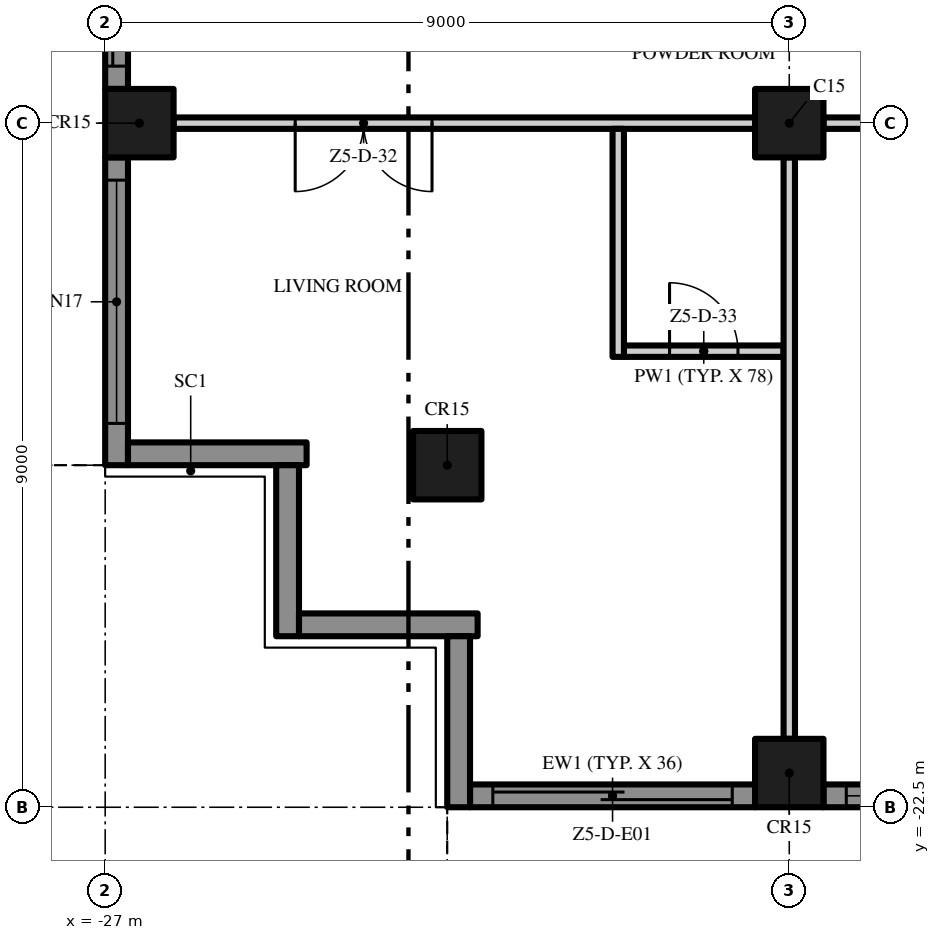
"""IFC4 building model, lengths in metres.
Left out: names, types, materials, properties, quantities, classifications, styles, units other than length and angle.
Written with IfcOpenShell. Run it as: python <this file> out.ifc"""

import sys

from ifc_helpers import new_model, si_unit, direction, frame, frame_2d, origin, origin_2d, place, context, subcontext, project, spatial, polyline, rectangle, outline, extrude, element, fill, save


model = new_model("IFC4")
c1 = context("Model", 3, precision=1e-05, world=origin(), true_north=direction((0.0, 1.0)))
c2 = subcontext(c1, "Body", "Model", "MODEL_VIEW")
j1 = project(units=[si_unit("LENGTHUNIT", "METRE"), si_unit("PLANEANGLEUNIT", "RADIAN")], contexts=[c1])
p1 = place(None, origin())
s1 = spatial("IfcSite", under=j1, at=p1, CompositionType="ELEMENT")
p2 = place(p1, origin())
s2 = spatial("IfcBuilding", under=s1, at=p2, CompositionType="ELEMENT")
p3 = place(p2, frame((0.0, 0.0, 280.6)))
s3 = spatial("IfcBuildingStorey", under=s2, at=p3, CompositionType="ELEMENT", Elevation=280.6)
for number, where, z_axis, x_axis in (
    (1, (-18.0, -13.5, 0.0), (0.0, 0.0, 1.0), (1.0, 0.0, 0.0)),
    (2, (-18.0, -22.05, 0.0), (0.0, 0.0, 1.0), (1.0, 0.0, 0.0)),
    (3, (-26.55, -13.5, 0.0), (0.0, 0.0, 1.0), (1.0, 0.0, 0.0)),
    (4, (-22.5, -18.0, 0.0), (0.0, 0.0, 1.0), (1.0, 0.0, 0.0)),
):
    element("IfcColumn", number, at=place(p3, frame(where, z_axis=z_axis, x_axis=x_axis)), inside=s3, PredefinedType="COLUMN", context=c2, shape_type="SweptSolid", body=[
        extrude(rectangle(XDim=0.9, YDim=0.9, at=origin_2d()), origin(), (0.0, 0.0, 1.0), 3.5),
    ])
p4 = place(p3, frame((-18.45, -22.35, 0.0), z_axis=(0.0, 0.0, 1.0), x_axis=(-1.0, 0.0, 0.0)))
e5 = element("IfcWall", 5, at=p4, inside=s3, PredefinedType="SOLIDWALL", context=c2, shape_type="SweptSolid", body=[
    extrude(rectangle(XDim=3.75, YDim=0.3, at=frame_2d((1.875, 0.0))), origin(), (0.0, 0.0, 1.0), 3.5),
])
p5 = place(p4, frame((0.3, 0.0, 0.0)))
e6 = element("IfcOpeningElement", 6, at=p5, cuts=e5, PredefinedType="OPENING", context=c2, shape_type="SweptSolid", body=[
    extrude(rectangle(XDim=3.15, YDim=2.4, at=frame_2d((1.575, 1.2))), frame((0.0, 0.16, 0.0), z_axis=(0.0, -1.0, 0.0), x_axis=(1.0, 0.0, 0.0)), (0.0, 0.0, 1.0), 0.32),
])
p6 = place(p3, frame((-9.45, -22.35, 0.0), z_axis=(0.0, 0.0, 1.0), x_axis=(-1.0, 0.0, 0.0)))
e7 = element("IfcWall", 7, at=p6, inside=s3, PredefinedType="SOLIDWALL", context=c2, shape_type="SweptSolid", body=[
    extrude(rectangle(XDim=8.1, YDim=0.3, at=frame_2d((4.05, 0.0))), origin(), (0.0, 0.0, 1.0), 3.5),
])
p7 = place(p6, frame((4.6, 0.0, 0.45)))
e8 = element("IfcOpeningElement", 8, at=p7, cuts=e7, PredefinedType="OPENING", context=c2, shape_type="SweptSolid", body=[
    extrude(rectangle(XDim=3.2, YDim=2.65, at=frame_2d((1.6, 1.325))), frame((0.0, 0.16, 0.0), z_axis=(0.0, -1.0, 0.0), x_axis=(1.0, 0.0, 0.0)), (0.0, 0.0, 1.0), 0.32),
])
p8 = place(p6, frame((0.3, 0.0, 0.45)))
e9 = element("IfcOpeningElement", 9, at=p8, cuts=e7, PredefinedType="OPENING", context=c2, shape_type="SweptSolid", body=[
    extrude(rectangle(XDim=3.2, YDim=2.65, at=frame_2d((1.6, 1.325))), frame((0.0, 0.16, 0.0), z_axis=(0.0, -1.0, 0.0), x_axis=(1.0, 0.0, 0.0)), (0.0, 0.0, 1.0), 0.32),
])
p9 = place(p3, frame((-26.85, -13.05, 0.0), z_axis=(0.0, 0.0, 1.0), x_axis=(0.0, 1.0, 0.0)))
e10 = element("IfcWall", 10, at=p9, inside=s3, PredefinedType="SOLIDWALL", context=c2, shape_type="SweptSolid", body=[
    extrude(rectangle(XDim=8.1, YDim=0.3, at=frame_2d((4.05, 0.0))), origin(), (0.0, 0.0, 1.0), 3.5),
])
p10 = place(p9, frame((4.6, 0.0, 0.45)))
e11 = element("IfcOpeningElement", 11, at=p10, cuts=e10, PredefinedType="OPENING", context=c2, shape_type="SweptSolid", body=[
    extrude(rectangle(XDim=3.2, YDim=2.65, at=frame_2d((1.6, 1.325))), frame((0.0, 0.16, 0.0), z_axis=(0.0, -1.0, 0.0), x_axis=(1.0, 0.0, 0.0)), (0.0, 0.0, 1.0), 0.32),
])
p11 = place(p9, frame((0.3, 0.0, 0.0)))
e12 = element("IfcOpeningElement", 12, at=p11, cuts=e10, PredefinedType="OPENING", context=c2, shape_type="SweptSolid", body=[
    extrude(rectangle(XDim=3.2, YDim=2.4, at=frame_2d((1.6, 1.2))), frame((0.0, 0.16, 0.0), z_axis=(0.0, -1.0, 0.0), x_axis=(1.0, 0.0, 0.0)), (0.0, 0.0, 1.0), 0.32),
])
p12 = place(p3, frame((-26.85, -18.0, 0.0), z_axis=(0.0, 0.0, 1.0), x_axis=(0.0, 1.0, 0.0)))
e13 = element("IfcWall", 13, at=p12, inside=s3, PredefinedType="SOLIDWALL", context=c2, shape_type="SweptSolid", body=[
    extrude(rectangle(XDim=4.05, YDim=0.3, at=frame_2d((2.025, 0.0))), origin(), (0.0, 0.0, 1.0), 3.5),
])
p13 = place(p12, frame((0.55, 0.0, 0.45)))
e14 = element("IfcOpeningElement", 14, at=p13, cuts=e13, PredefinedType="OPENING", context=c2, shape_type="SweptSolid", body=[
    extrude(rectangle(XDim=3.2, YDim=2.65, at=frame_2d((1.6, 1.325))), frame((0.0, 0.16, 0.0), z_axis=(0.0, -1.0, 0.0), x_axis=(1.0, 0.0, 0.0)), (0.0, 0.0, 1.0), 0.32),
])
p14 = place(p3, frame((-24.35, -17.85, 0.0), z_axis=(0.0, 0.0, 1.0), x_axis=(-1.0, 0.0, 0.0)))
e15 = element("IfcWall", 15, at=p14, inside=s3, PredefinedType="SOLIDWALL", context=c2, shape_type="SweptSolid", body=[
    extrude(rectangle(XDim=2.35, YDim=0.3, at=frame_2d((1.175, 0.0))), origin(), (0.0, 0.0, 1.0), 3.5),
])
p15 = place(p3, frame((-24.6, -20.25, 0.0), z_axis=(0.0, 0.0, 1.0), x_axis=(0.0, 1.0, 0.0)))
e16 = element("IfcWall", 16, at=p15, inside=s3, PredefinedType="SOLIDWALL", context=c2, shape_type="SweptSolid", body=[
    extrude(rectangle(XDim=2.25, YDim=0.3, at=frame_2d((1.125, 0.0))), origin(), (0.0, 0.0, 1.0), 3.5),
])
p16 = place(p3, frame((-22.1, -20.1, 0.0), z_axis=(0.0, 0.0, 1.0), x_axis=(-1.0, 0.0, 0.0)))
e17 = element("IfcWall", 17, at=p16, inside=s3, PredefinedType="SOLIDWALL", context=c2, shape_type="SweptSolid", body=[
    extrude(rectangle(XDim=2.35, YDim=0.3, at=frame_2d((1.175, 0.0))), origin(), (0.0, 0.0, 1.0), 3.5),
])
p17 = place(p3, frame((-22.35, -22.5, 0.0), z_axis=(0.0, 0.0, 1.0), x_axis=(0.0, 1.0, 0.0)))
e18 = element("IfcWall", 18, at=p17, inside=s3, PredefinedType="SOLIDWALL", context=c2, shape_type="SweptSolid", body=[
    extrude(rectangle(XDim=2.25, YDim=0.3, at=frame_2d((1.125, 0.0))), origin(), (0.0, 0.0, 1.0), 3.5),
])
p18 = place(p3, origin())
e19 = element("IfcWall", 19, at=p18, inside=s3, PredefinedType="USERDEFINED", context=c2, shape_type="SweptSolid", body=[
    extrude(outline(polyline([(-22.5, -25.5), (-21.0, -25.271), (-19.5, -24.671), (-18.0, -23.929), (-16.5, -23.329), (-15.0, -23.1), (-13.5, -23.329), (-12.0, -23.929), (-10.5, -24.671), (-9.0, -25.271), (-7.5, -25.5), (-6.0, -25.271), (-4.5, -24.671), (-3.0, -23.929), (-1.5, -23.329), (0.0, -23.1), (1.5, -23.329), (3.0, -23.929), (4.5, -24.671), (6.0, -25.271), (7.5, -25.5), (9.0, -25.271), (10.5, -24.671), (12.0, -23.929), (13.5, -23.329), (15.0, -23.1), (16.5, -23.329), (18.0, -23.929), (19.5, -24.671), (21.0, -25.271), (22.5, -25.5), (22.538, -25.253), (21.066, -25.028), (19.602, -24.442), (18.102, -23.701), (16.566, -23.086), (15.0, -22.847), (13.434, -23.086), (11.898, -23.701), (10.398, -24.442), (8.934, -25.028), (7.5, -25.247), (6.066, -25.028), (4.602, -24.442), (3.102, -23.701), (1.566, -23.086), (0.0, -22.847), (-1.566, -23.086), (-3.102, -23.701), (-4.602, -24.442), (-6.066, -25.028), (-7.5, -25.247), (-8.934, -25.028), (-10.398, -24.442), (-11.898, -23.701), (-13.434, -23.086), (-15.0, -22.847), (-16.566, -23.086), (-18.102, -23.701), (-19.602, -24.442), (-21.066, -25.028), (-22.538, -25.253), (-22.5, -25.5)])), origin(), (0.0, 0.0, 1.0), 0.9),
])
p19 = place(p3, origin())
e20 = element("IfcWall", 20, at=p19, inside=s3, PredefinedType="USERDEFINED", context=c2, shape_type="SweptSolid", body=[
    extrude(outline(polyline([(-30.0, 18.0), (-29.771, 16.5), (-29.171, 15.0), (-28.429, 13.5), (-27.829, 12.0), (-27.6, 10.5), (-27.829, 9.0), (-28.429, 7.5), (-29.171, 6.0), (-29.771, 4.5), (-30.0, 3.0), (-29.771, 1.5), (-29.171, 0.0), (-28.429, -1.5), (-27.829, -3.0), (-27.6, -4.5), (-27.829, -6.0), (-28.429, -7.5), (-29.171, -9.0), (-29.771, -10.5), (-30.0, -12.0), (-29.771, -13.5), (-29.171, -15.0), (-28.429, -16.5), (-27.829, -18.0), (-27.597, -17.907), (-28.201, -16.398), (-28.942, -14.898), (-29.528, -13.434), (-29.747, -12.0), (-29.528, -10.566), (-28.942, -9.102), (-28.201, -7.602), (-27.586, -6.066), (-27.347, -4.5), (-27.586, -2.934), (-28.201, -1.398), (-28.942, 0.102), (-29.528, 1.566), (-29.747, 3.0), (-29.528, 4.434), (-28.942, 5.898), (-28.201, 7.398), (-27.586, 8.934), (-27.347, 10.5), (-27.586, 12.066), (-28.201, 13.602), (-28.942, 15.102), (-29.528, 16.566), (-29.753, 18.038), (-30.0, 18.0)])), origin(), (0.0, 0.0, 1.0), 0.9),
])
p20 = place(p3, frame((-20.175, -16.5, 0.0), z_axis=(0.0, 0.0, 1.0), x_axis=(1.0, 0.0, 0.0)))
e21 = element("IfcWall", 21, at=p20, inside=s3, PredefinedType="PARTITIONING", context=c2, shape_type="SweptSolid", body=[
    extrude(rectangle(XDim=2.1, YDim=0.15, at=frame_2d((1.05, 0.0))), origin(), (0.0, 0.0, 1.0), 3.5),
])
p21 = place(p20, frame((0.6, 0.0, 0.0)))
e22 = element("IfcOpeningElement", 22, at=p21, cuts=e21, PredefinedType="OPENING", context=c2, shape_type="SweptSolid", body=[
    extrude(rectangle(XDim=0.9, YDim=2.1, at=frame_2d((0.45, 1.05))), frame((0.0, 0.085, 0.0), z_axis=(0.0, -1.0, 0.0), x_axis=(1.0, 0.0, 0.0)), (0.0, 0.0, 1.0), 0.17),
])
p22 = place(p3, frame((-18.45, -13.5, 0.0), z_axis=(0.0, 0.0, 1.0), x_axis=(-1.0, 0.0, 0.0)))
e23 = element("IfcWall", 23, at=p22, inside=s3, PredefinedType="PARTITIONING", context=c2, shape_type="SweptSolid", body=[
    extrude(rectangle(XDim=7.65, YDim=0.15, at=frame_2d((3.825, 0.0))), origin(), (0.0, 0.0, 1.0), 3.5),
])
p23 = place(p22, frame((4.25, 0.0, 0.0)))
e24 = element("IfcOpeningElement", 24, at=p23, cuts=e23, PredefinedType="OPENING", context=c2, shape_type="SweptSolid", body=[
    extrude(rectangle(XDim=1.8, YDim=2.4, at=frame_2d((0.9, 1.2))), frame((0.0, 0.085, 0.0), z_axis=(0.0, -1.0, 0.0), x_axis=(1.0, 0.0, 0.0)), (0.0, 0.0, 1.0), 0.17),
])
p24 = place(p3, frame((-9.45, -13.5, 0.0), z_axis=(0.0, 0.0, 1.0), x_axis=(-1.0, 0.0, 0.0)))
e25 = element("IfcWall", 25, at=p24, inside=s3, PredefinedType="PARTITIONING", context=c2, shape_type="SweptSolid", body=[
    extrude(rectangle(XDim=8.1, YDim=0.15, at=frame_2d((4.05, 0.0))), origin(), (0.0, 0.0, 1.0), 3.5),
])
p25 = place(p24, frame((0.2, 0.0, 0.0)))
e26 = element("IfcOpeningElement", 26, at=p25, cuts=e25, PredefinedType="OPENING", context=c2, shape_type="SweptSolid", body=[
    extrude(rectangle(XDim=1.0, YDim=2.4, at=frame_2d((0.5, 1.2))), frame((0.0, 0.085, 0.0), z_axis=(0.0, -1.0, 0.0), x_axis=(1.0, 0.0, 0.0)), (0.0, 0.0, 1.0), 0.17),
])
p26 = place(p24, frame((5.8, 0.0, 0.0)))
e27 = element("IfcOpeningElement", 27, at=p26, cuts=e25, PredefinedType="OPENING", context=c2, shape_type="SweptSolid", body=[
    extrude(rectangle(XDim=1.0, YDim=2.4, at=frame_2d((0.5, 1.2))), frame((0.0, 0.085, 0.0), z_axis=(0.0, -1.0, 0.0), x_axis=(1.0, 0.0, 0.0)), (0.0, 0.0, 1.0), 0.17),
])
p27 = place(p3, frame((-20.25, -16.575, 0.0), z_axis=(0.0, 0.0, 1.0), x_axis=(0.0, 1.0, 0.0)))
e28 = element("IfcWall", 28, at=p27, inside=s3, PredefinedType="PARTITIONING", context=c2, shape_type="SweptSolid", body=[
    extrude(rectangle(XDim=3.0, YDim=0.15, at=frame_2d((1.5, 0.0))), origin(), (0.0, 0.0, 1.0), 3.5),
])
p28 = place(p3, frame((-18.0, -21.6, 0.0), z_axis=(0.0, 0.0, 1.0), x_axis=(0.0, 1.0, 0.0)))
e29 = element("IfcWall", 29, at=p28, inside=s3, PredefinedType="PARTITIONING", context=c2, shape_type="SweptSolid", body=[
    extrude(rectangle(XDim=7.65, YDim=0.15, at=frame_2d((3.825, 0.0))), origin(), (0.0, 0.0, 1.0), 3.5),
])
p29 = place(p5, origin())
e30 = element("IfcDoor", 30, at=p29, inside=s3, OperationType="SINGLE_SWING_LEFT", PredefinedType="DOOR", context=c2, shape_type="SweptSolid", body=[
    extrude(rectangle(XDim=3.15, YDim=2.4, at=frame_2d((1.575, 1.2))), frame((0.0, 0.025, 0.0), z_axis=(0.0, -1.0, 0.0), x_axis=(1.0, 0.0, 0.0)), (0.0, 0.0, 1.0), 0.05),
])
fill(e6, e30)
p30 = place(p7, origin())
e31 = element("IfcWindow", 31, at=p30, inside=s3, PartitioningType="SINGLE_PANEL", PredefinedType="WINDOW", context=c2, shape_type="SweptSolid", body=[
    extrude(rectangle(XDim=3.2, YDim=2.65, at=frame_2d((1.6, 1.325))), frame((0.0, 0.03, 0.0), z_axis=(0.0, -1.0, 0.0), x_axis=(1.0, 0.0, 0.0)), (0.0, 0.0, 1.0), 0.06),
])
fill(e8, e31)
p31 = place(p11, origin())
e32 = element("IfcDoor", 32, at=p31, inside=s3, OperationType="SINGLE_SWING_LEFT", PredefinedType="DOOR", context=c2, shape_type="SweptSolid", body=[
    extrude(rectangle(XDim=3.2, YDim=2.4, at=frame_2d((1.6, 1.2))), frame((0.0, 0.025, 0.0), z_axis=(0.0, -1.0, 0.0), x_axis=(1.0, 0.0, 0.0)), (0.0, 0.0, 1.0), 0.05),
])
fill(e12, e32)
p32 = place(p13, origin())
e33 = element("IfcWindow", 33, at=p32, inside=s3, PartitioningType="SINGLE_PANEL", PredefinedType="WINDOW", context=c2, shape_type="SweptSolid", body=[
    extrude(rectangle(XDim=3.2, YDim=2.65, at=frame_2d((1.6, 1.325))), frame((0.0, 0.03, 0.0), z_axis=(0.0, -1.0, 0.0), x_axis=(1.0, 0.0, 0.0)), (0.0, 0.0, 1.0), 0.06),
])
fill(e14, e33)
p33 = place(p23, origin())
e34 = element("IfcDoor", 34, at=p33, inside=s3, OperationType="DOUBLE_DOOR_SINGLE_SWING", PredefinedType="DOOR", context=c2, shape_type="SweptSolid", body=[
    extrude(rectangle(XDim=1.8, YDim=2.4, at=frame_2d((0.9, 1.2))), frame((0.0, 0.025, 0.0), z_axis=(0.0, -1.0, 0.0), x_axis=(1.0, 0.0, 0.0)), (0.0, 0.0, 1.0), 0.05),
])
fill(e24, e34)
p34 = place(p21, origin())
e35 = element("IfcDoor", 35, at=p34, inside=s3, OperationType="SINGLE_SWING_LEFT", PredefinedType="DOOR", context=c2, shape_type="SweptSolid", body=[
    extrude(rectangle(XDim=0.9, YDim=2.1, at=frame_2d((0.45, 1.05))), frame((0.0, 0.025, 0.0), z_axis=(0.0, -1.0, 0.0), x_axis=(1.0, 0.0, 0.0)), (0.0, 0.0, 1.0), 0.05),
])
fill(e22, e35)
save(model, sys.argv[1])
